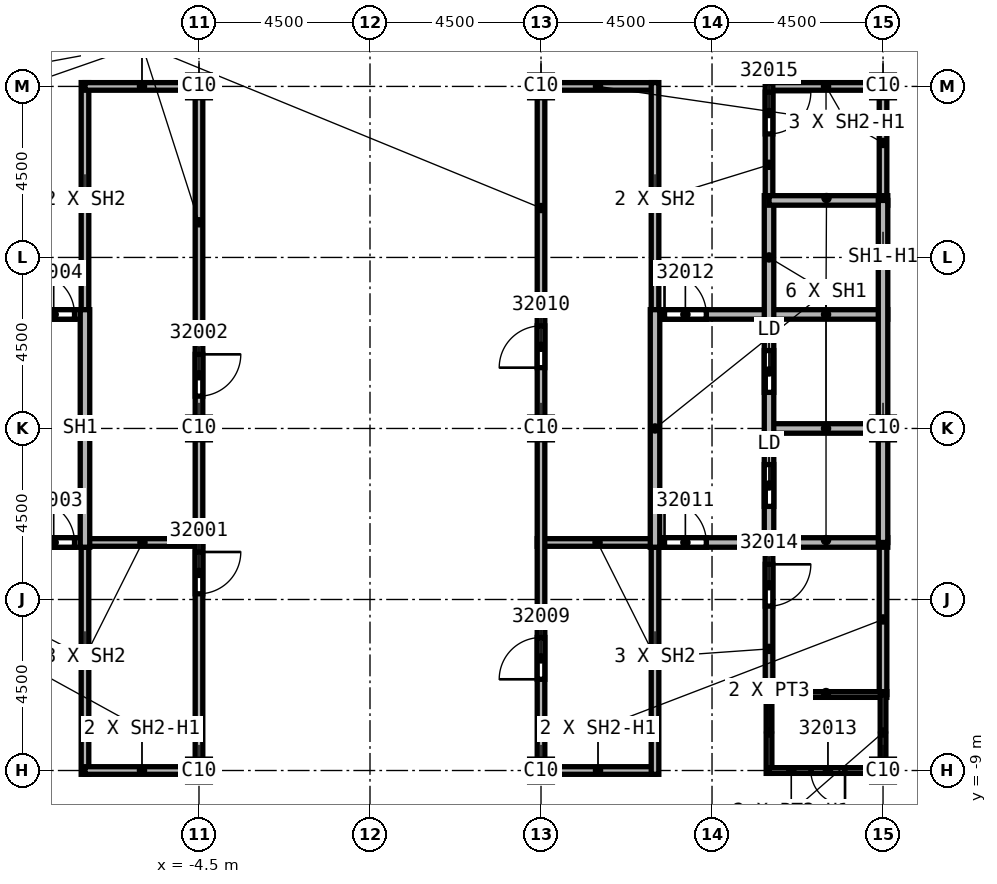
"""IFC4 building model, lengths in metres.
Left out: names, types, materials, properties, quantities, classifications, styles, units other than length and angle.
Written with IfcOpenShell. Run it as: python <this file> out.ifc"""

import sys

from ifc_helpers import new_model, si_unit, direction, frame, frame_2d, origin, origin_2d, place, context, subcontext, project, spatial, rectangle, extrude, element, fill, save


model = new_model("IFC4")
c1 = context("Model", 3, precision=1e-05, world=origin(), true_north=direction((0.0, 1.0)))
c2 = subcontext(c1, "Body", "Model", "MODEL_VIEW")
j1 = project(units=[si_unit("LENGTHUNIT", "METRE"), si_unit("PLANEANGLEUNIT", "RADIAN")], contexts=[c1])
p1 = place(None, origin())
s1 = spatial("IfcSite", under=j1, at=p1, CompositionType="ELEMENT")
p2 = place(p1, origin())
s2 = spatial("IfcBuilding", under=s1, at=p2, CompositionType="ELEMENT")
p3 = place(p2, frame((0.0, 0.0, 356.0)))
s3 = spatial("IfcBuildingStorey", under=s2, at=p3, CompositionType="ELEMENT", Elevation=356.0)
for number, where, z_axis, x_axis in (
    (1, (4.5, 0.0, 0.0), (0.0, 0.0, 1.0), (1.0, 0.0, 0.0)),
    (2, (4.5, 9.0, 0.0), (0.0, 0.0, 1.0), (1.0, 0.0, 0.0)),
    (3, (4.5, -9.0, 0.0), (0.0, 0.0, 1.0), (1.0, 0.0, 0.0)),
    (4, (13.5, 0.0, 0.0), (0.0, 0.0, 1.0), (1.0, 0.0, 0.0)),
    (5, (13.5, 9.0, 0.0), (0.0, 0.0, 1.0), (1.0, 0.0, 0.0)),
    (6, (13.5, -9.0, 0.0), (0.0, 0.0, 1.0), (1.0, 0.0, 0.0)),
    (7, (-4.5, 0.0, 0.0), (0.0, 0.0, 1.0), (1.0, 0.0, 0.0)),
    (8, (-4.5, 9.0, 0.0), (0.0, 0.0, 1.0), (1.0, 0.0, 0.0)),
    (9, (-4.5, -9.0, 0.0), (0.0, 0.0, 1.0), (1.0, 0.0, 0.0)),
):
    element("IfcColumn", number, at=place(p3, frame(where, z_axis=z_axis, x_axis=x_axis)), inside=s3, PredefinedType="COLUMN", context=c2, shape_type="SweptSolid", body=[
        extrude(rectangle(XDim=0.6, YDim=0.6, at=origin_2d()), origin(), (0.0, 0.0, 1.0), 4.6),
    ])
p4 = place(p3, frame((-7.625, -3.0, 0.0), z_axis=(0.0, 0.0, 1.0), x_axis=(1.0, 0.0, 0.0)))
e10 = element("IfcWall", 10, at=p4, inside=s3, PredefinedType="SOLIDWALL", context=c2, shape_type="SweptSolid", body=[
    extrude(rectangle(XDim=3.225, YDim=0.2, at=frame_2d((1.613, 0.0))), origin(), (0.0, 0.0, 1.0), 4.15),
])
for number, where, z_axis, x_axis in (
    (11, (-7.5, -9.1, 0.0), (0.0, 0.0, 1.0), (0.0, 1.0, 0.0)),
    (12, (-7.5, 2.875, 0.0), (0.0, 0.0, 1.0), (0.0, 1.0, 0.0)),
):
    element("IfcWall", number, at=place(p3, frame(where, z_axis=z_axis, x_axis=x_axis)), inside=s3, PredefinedType="SOLIDWALL", context=c2, shape_type="SweptSolid", body=[
        extrude(rectangle(XDim=6.225, YDim=0.2, at=frame_2d((3.113, 0.0))), origin(), (0.0, 0.0, 1.0), 4.15),
    ])
for number, where, z_axis, x_axis in (
    (13, (-7.5, 9.0, 0.0), (0.0, 0.0, 1.0), (1.0, 0.0, 0.0)),
    (14, (-4.5, -9.0, 0.0), (0.0, 0.0, 1.0), (-1.0, 0.0, 0.0)),
):
    element("IfcWall", number, at=place(p3, frame(where, z_axis=z_axis, x_axis=x_axis)), inside=s3, PredefinedType="SOLIDWALL", context=c2, shape_type="SweptSolid", body=[
        extrude(rectangle(XDim=3.0, YDim=0.2, at=frame_2d((1.5, 0.0))), origin(), (0.0, 0.0, 1.0), 3.838),
    ])
p5 = place(p3, frame((-4.5, 9.1, 0.0), z_axis=(0.0, 0.0, 1.0), x_axis=(0.0, -1.0, 0.0)))
e15 = element("IfcWall", 15, at=p5, inside=s3, PredefinedType="SOLIDWALL", context=c2, shape_type="SweptSolid", body=[
    extrude(rectangle(XDim=18.2, YDim=0.2, at=frame_2d((9.1, 0.0))), origin(), (0.0, 0.0, 1.0), 3.838),
])
p6 = place(p5, frame((12.35, 0.0, 0.0)))
e16 = element("IfcOpeningElement", 16, at=p6, cuts=e15, PredefinedType="OPENING", context=c2, shape_type="SweptSolid", body=[
    extrude(rectangle(XDim=1.1, YDim=2.1, at=frame_2d((0.55, 1.05))), frame((0.0, 0.1, 0.0), z_axis=(0.0, -1.0, 0.0), x_axis=(1.0, 0.0, 0.0)), (0.0, 0.0, 1.0), 0.2),
])
p7 = place(p5, frame((7.15, 0.0, 0.0)))
e17 = element("IfcOpeningElement", 17, at=p7, cuts=e15, PredefinedType="OPENING", context=c2, shape_type="SweptSolid", body=[
    extrude(rectangle(XDim=1.1, YDim=2.1, at=frame_2d((0.55, 1.05))), frame((0.0, 0.1, 0.0), z_axis=(0.0, -1.0, 0.0), x_axis=(1.0, 0.0, 0.0)), (0.0, 0.0, 1.0), 0.2),
])
p8 = place(p3, frame((4.4, -3.0, 0.0), z_axis=(0.0, 0.0, 1.0), x_axis=(1.0, 0.0, 0.0)))
e18 = element("IfcWall", 18, at=p8, inside=s3, PredefinedType="SOLIDWALL", context=c2, shape_type="SweptSolid", body=[
    extrude(rectangle(XDim=3.225, YDim=0.2, at=frame_2d((1.613, 0.0))), origin(), (0.0, 0.0, 1.0), 4.15),
])
p9 = place(p3, frame((4.5, -9.1, 0.0), z_axis=(0.0, 0.0, 1.0), x_axis=(0.0, 1.0, 0.0)))
e19 = element("IfcWall", 19, at=p9, inside=s3, PredefinedType="SOLIDWALL", context=c2, shape_type="SweptSolid", body=[
    extrude(rectangle(XDim=18.2, YDim=0.2, at=frame_2d((9.1, 0.0))), origin(), (0.0, 0.0, 1.0), 3.838),
])
p10 = place(p9, frame((2.5, 0.0, 0.0)))
e20 = element("IfcOpeningElement", 20, at=p10, cuts=e19, PredefinedType="OPENING", context=c2, shape_type="SweptSolid", body=[
    extrude(rectangle(XDim=1.1, YDim=2.1, at=frame_2d((0.55, 1.05))), frame((0.0, 0.1, 0.0), z_axis=(0.0, -1.0, 0.0), x_axis=(1.0, 0.0, 0.0)), (0.0, 0.0, 1.0), 0.2),
])
p11 = place(p9, frame((10.7, 0.0, 0.0)))
e21 = element("IfcOpeningElement", 21, at=p11, cuts=e19, PredefinedType="OPENING", context=c2, shape_type="SweptSolid", body=[
    extrude(rectangle(XDim=1.1, YDim=2.1, at=frame_2d((0.55, 1.05))), frame((0.0, 0.1, 0.0), z_axis=(0.0, -1.0, 0.0), x_axis=(1.0, 0.0, 0.0)), (0.0, 0.0, 1.0), 0.2),
])
for number, where, z_axis, x_axis in (
    (22, (4.5, 9.0, 0.0), (0.0, 0.0, 1.0), (1.0, 0.0, 0.0)),
    (23, (7.5, -9.0, 0.0), (0.0, 0.0, 1.0), (-1.0, 0.0, 0.0)),
):
    element("IfcWall", number, at=place(p3, frame(where, z_axis=z_axis, x_axis=x_axis)), inside=s3, PredefinedType="SOLIDWALL", context=c2, shape_type="SweptSolid", body=[
        extrude(rectangle(XDim=3.0, YDim=0.2, at=frame_2d((1.5, 0.0))), origin(), (0.0, 0.0, 1.0), 3.838),
    ])
for number, where, z_axis, x_axis in (
    (24, (7.5, -2.875, 0.0), (0.0, 0.0, 1.0), (0.0, -1.0, 0.0)),
    (25, (7.5, 9.1, 0.0), (0.0, 0.0, 1.0), (0.0, -1.0, 0.0)),
):
    element("IfcWall", number, at=place(p3, frame(where, z_axis=z_axis, x_axis=x_axis)), inside=s3, PredefinedType="SOLIDWALL", context=c2, shape_type="SweptSolid", body=[
        extrude(rectangle(XDim=6.225, YDim=0.2, at=frame_2d((3.113, 0.0))), origin(), (0.0, 0.0, 1.0), 4.15),
    ])
p12 = place(p3, frame((10.5, -2.875, 0.0), z_axis=(0.0, 0.0, 1.0), x_axis=(0.0, -1.0, 0.0)))
e26 = element("IfcWall", 26, at=p12, inside=s3, PredefinedType="SOLIDWALL", context=c2, shape_type="SweptSolid", body=[
    extrude(rectangle(XDim=4.2, YDim=0.2, at=frame_2d((2.1, 0.0))), origin(), (0.0, 0.0, 1.0), 4.15),
])
p13 = place(p12, frame((0.7, 0.0, 0.0)))
e27 = element("IfcOpeningElement", 27, at=p13, cuts=e26, PredefinedType="OPENING", context=c2, shape_type="SweptSolid", body=[
    extrude(rectangle(XDim=1.1, YDim=2.1, at=frame_2d((0.55, 1.05))), frame((0.0, 0.1, 0.0), z_axis=(0.0, -1.0, 0.0), x_axis=(1.0, 0.0, 0.0)), (0.0, 0.0, 1.0), 0.2),
])
p14 = place(p3, frame((10.5, 9.0, 0.0), z_axis=(0.0, 0.0, 1.0), x_axis=(1.0, 0.0, 0.0)))
e28 = element("IfcWall", 28, at=p14, inside=s3, PredefinedType="SOLIDWALL", context=c2, shape_type="SweptSolid", body=[
    extrude(rectangle(XDim=3.0, YDim=0.2, at=frame_2d((1.5, 0.0))), origin(), (0.0, 0.0, 1.0), 3.838),
])
p15 = place(p3, frame((10.5, 9.1, 0.0), z_axis=(0.0, 0.0, 1.0), x_axis=(0.0, -1.0, 0.0)))
e29 = element("IfcWall", 29, at=p15, inside=s3, PredefinedType="SOLIDWALL", context=c2, shape_type="SweptSolid", body=[
    extrude(rectangle(XDim=3.225, YDim=0.2, at=frame_2d((1.613, 0.0))), origin(), (0.0, 0.0, 1.0), 4.15),
])
p16 = place(p15, frame((0.25, 0.0, 0.0)))
e30 = element("IfcOpeningElement", 30, at=p16, cuts=e29, PredefinedType="OPENING", context=c2, shape_type="SweptSolid", body=[
    extrude(rectangle(XDim=1.1, YDim=2.1, at=frame_2d((0.55, 1.05))), frame((0.0, 0.1, 0.0), z_axis=(0.0, -1.0, 0.0), x_axis=(1.0, 0.0, 0.0)), (0.0, 0.0, 1.0), 0.2),
])
p17 = place(p3, frame((13.5, -3.0, 0.0), z_axis=(0.0, 0.0, 1.0), x_axis=(0.0, -1.0, 0.0)))
e31 = element("IfcWall", 31, at=p17, inside=s3, PredefinedType="SOLIDWALL", context=c2, shape_type="SweptSolid", body=[
    extrude(rectangle(XDim=4.0, YDim=0.2, at=frame_2d((2.0, 0.0))), origin(), (0.0, 0.0, 1.0), 3.838),
])
p18 = place(p3, frame((13.5, 9.1, 0.0), z_axis=(0.0, 0.0, 1.0), x_axis=(0.0, -1.0, 0.0)))
e32 = element("IfcWall", 32, at=p18, inside=s3, PredefinedType="SOLIDWALL", context=c2, shape_type="SweptSolid", body=[
    extrude(rectangle(XDim=3.1, YDim=0.2, at=frame_2d((1.55, 0.0))), origin(), (0.0, 0.0, 1.0), 3.838),
])
p19 = place(p3, frame((-13.625, 3.0, 0.0), z_axis=(0.0, 0.0, 1.0), x_axis=(1.0, 0.0, 0.0)))
e33 = element("IfcWall", 33, at=p19, inside=s3, PredefinedType="SOLIDWALL", context=c2, shape_type="SweptSolid", body=[
    extrude(rectangle(XDim=6.125, YDim=0.25, at=frame_2d((3.062, 0.0))), origin(), (0.0, 0.0, 1.0), 4.15),
])
p20 = place(p19, frame((4.75, 0.0, 0.0)))
e34 = element("IfcOpeningElement", 34, at=p20, cuts=e33, PredefinedType="OPENING", context=c2, shape_type="SweptSolid", body=[
    extrude(rectangle(XDim=1.1, YDim=2.1, at=frame_2d((0.55, 1.05))), frame((0.0, 0.125, 0.0), z_axis=(0.0, -1.0, 0.0), x_axis=(1.0, 0.0, 0.0)), (0.0, 0.0, 1.0), 0.25),
])
p21 = place(p3, frame((-13.625, -3.0, 0.0), z_axis=(0.0, 0.0, 1.0), x_axis=(1.0, 0.0, 0.0)))
e35 = element("IfcWall", 35, at=p21, inside=s3, PredefinedType="SOLIDWALL", context=c2, shape_type="SweptSolid", body=[
    extrude(rectangle(XDim=6.125, YDim=0.25, at=frame_2d((3.062, 0.0))), origin(), (0.0, 0.0, 1.0), 4.15),
])
p22 = place(p21, frame((4.75, 0.0, 0.0)))
e36 = element("IfcOpeningElement", 36, at=p22, cuts=e35, PredefinedType="OPENING", context=c2, shape_type="SweptSolid", body=[
    extrude(rectangle(XDim=1.1, YDim=2.1, at=frame_2d((0.55, 1.05))), frame((0.0, 0.125, 0.0), z_axis=(0.0, -1.0, 0.0), x_axis=(1.0, 0.0, 0.0)), (0.0, 0.0, 1.0), 0.25),
])
p23 = place(p3, frame((-7.5, -3.125, 0.0), z_axis=(0.0, 0.0, 1.0), x_axis=(0.0, 1.0, 0.0)))
e37 = element("IfcWall", 37, at=p23, inside=s3, PredefinedType="SOLIDWALL", context=c2, shape_type="SweptSolid", body=[
    extrude(rectangle(XDim=6.25, YDim=0.25, at=frame_2d((3.125, 0.0))), origin(), (0.0, 0.0, 1.0), 4.15),
])
p24 = place(p3, frame((7.5, -3.0, 0.0), z_axis=(0.0, 0.0, 1.0), x_axis=(1.0, 0.0, 0.0)))
e38 = element("IfcWall", 38, at=p24, inside=s3, PredefinedType="SOLIDWALL", context=c2, shape_type="SweptSolid", body=[
    extrude(rectangle(XDim=6.125, YDim=0.25, at=frame_2d((3.062, 0.0))), origin(), (0.0, 0.0, 1.0), 4.15),
])
p25 = place(p24, frame((0.25, 0.0, 0.0)))
e39 = element("IfcOpeningElement", 39, at=p25, cuts=e38, PredefinedType="OPENING", context=c2, shape_type="SweptSolid", body=[
    extrude(rectangle(XDim=1.1, YDim=2.1, at=frame_2d((0.55, 1.05))), frame((0.0, 0.125, 0.0), z_axis=(0.0, -1.0, 0.0), x_axis=(1.0, 0.0, 0.0)), (0.0, 0.0, 1.0), 0.25),
])
p26 = place(p3, frame((7.5, 3.0, 0.0), z_axis=(0.0, 0.0, 1.0), x_axis=(1.0, 0.0, 0.0)))
e40 = element("IfcWall", 40, at=p26, inside=s3, PredefinedType="SOLIDWALL", context=c2, shape_type="SweptSolid", body=[
    extrude(rectangle(XDim=6.125, YDim=0.25, at=frame_2d((3.062, 0.0))), origin(), (0.0, 0.0, 1.0), 4.15),
])
p27 = place(p26, frame((0.25, 0.0, 0.0)))
e41 = element("IfcOpeningElement", 41, at=p27, cuts=e40, PredefinedType="OPENING", context=c2, shape_type="SweptSolid", body=[
    extrude(rectangle(XDim=1.1, YDim=2.1, at=frame_2d((0.55, 1.05))), frame((0.0, 0.125, 0.0), z_axis=(0.0, -1.0, 0.0), x_axis=(1.0, 0.0, 0.0)), (0.0, 0.0, 1.0), 0.25),
])
p28 = place(p3, frame((7.5, 3.125, 0.0), z_axis=(0.0, 0.0, 1.0), x_axis=(0.0, -1.0, 0.0)))
e42 = element("IfcWall", 42, at=p28, inside=s3, PredefinedType="SOLIDWALL", context=c2, shape_type="SweptSolid", body=[
    extrude(rectangle(XDim=6.25, YDim=0.25, at=frame_2d((3.125, 0.0))), origin(), (0.0, 0.0, 1.0), 4.15),
])
p29 = place(p3, frame((10.5, 0.0, 0.0), z_axis=(0.0, 0.0, 1.0), x_axis=(1.0, 0.0, 0.0)))
e43 = element("IfcWall", 43, at=p29, inside=s3, PredefinedType="SOLIDWALL", context=c2, shape_type="SweptSolid", body=[
    extrude(rectangle(XDim=3.125, YDim=0.25, at=frame_2d((1.562, 0.0))), origin(), (0.0, 0.0, 1.0), 4.15),
])
p30 = place(p3, frame((10.5, 6.125, 0.0), z_axis=(0.0, 0.0, 1.0), x_axis=(0.0, -1.0, 0.0)))
e44 = element("IfcWall", 44, at=p30, inside=s3, PredefinedType="SOLIDWALL", context=c2, shape_type="SweptSolid", body=[
    extrude(rectangle(XDim=9.25, YDim=0.25, at=frame_2d((4.625, 0.0))), origin(), (0.0, 0.0, 1.0), 4.15),
])
p31 = place(p30, frame((7.075, 0.0, 0.0)))
e45 = element("IfcOpeningElement", 45, at=p31, cuts=e44, PredefinedType="OPENING", context=c2, shape_type="SweptSolid", body=[
    extrude(rectangle(XDim=1.1, YDim=2.1, at=frame_2d((0.55, 1.05))), frame((0.0, 0.125, 0.0), z_axis=(0.0, -1.0, 0.0), x_axis=(1.0, 0.0, 0.0)), (0.0, 0.0, 1.0), 0.25),
])
p32 = place(p30, frame((4.075, 0.0, 0.0)))
e46 = element("IfcOpeningElement", 46, at=p32, cuts=e44, PredefinedType="OPENING", context=c2, shape_type="SweptSolid", body=[
    extrude(rectangle(XDim=1.1, YDim=2.1, at=frame_2d((0.55, 1.05))), frame((0.0, 0.125, 0.0), z_axis=(0.0, -1.0, 0.0), x_axis=(1.0, 0.0, 0.0)), (0.0, 0.0, 1.0), 0.25),
])
p33 = place(p3, frame((10.5, 6.0, 0.0), z_axis=(0.0, 0.0, 1.0), x_axis=(1.0, 0.0, 0.0)))
e47 = element("IfcWall", 47, at=p33, inside=s3, PredefinedType="SOLIDWALL", context=c2, shape_type="SweptSolid", body=[
    extrude(rectangle(XDim=3.125, YDim=0.25, at=frame_2d((1.562, 0.0))), origin(), (0.0, 0.0, 1.0), 4.15),
])
p34 = place(p3, frame((13.5, 6.0, 0.0), z_axis=(0.0, 0.0, 1.0), x_axis=(0.0, -1.0, 0.0)))
e48 = element("IfcWall", 48, at=p34, inside=s3, PredefinedType="SOLIDWALL", context=c2, shape_type="SweptSolid", body=[
    extrude(rectangle(XDim=9.0, YDim=0.25, at=frame_2d((4.5, 0.0))), origin(), (0.0, 0.0, 1.0), 3.838),
])
p35 = place(p3, frame((10.5, -7.0, 0.0), z_axis=(0.0, 0.0, 1.0), x_axis=(1.0, 0.0, 0.0)))
e49 = element("IfcWall", 49, at=p35, inside=s3, PredefinedType="PARTITIONING", context=c2, shape_type="SweptSolid", body=[
    extrude(rectangle(XDim=3.1, YDim=0.15, at=frame_2d((1.55, 0.0))), origin(), (0.0, 0.0, 1.0), 4.15),
])
p36 = place(p3, frame((10.5, -6.925, 0.0), z_axis=(0.0, 0.0, 1.0), x_axis=(0.0, -1.0, 0.0)))
e50 = element("IfcWall", 50, at=p36, inside=s3, PredefinedType="PARTITIONING", context=c2, shape_type="SweptSolid", body=[
    extrude(rectangle(XDim=2.15, YDim=0.15, at=frame_2d((1.075, 0.0))), origin(), (0.0, 0.0, 1.0), 4.15),
])
p37 = place(p3, frame((13.5, -9.0, 0.0), z_axis=(0.0, 0.0, 1.0), x_axis=(-1.0, 0.0, 0.0)))
e51 = element("IfcWall", 51, at=p37, inside=s3, PredefinedType="PARTITIONING", context=c2, shape_type="SweptSolid", body=[
    extrude(rectangle(XDim=3.0, YDim=0.15, at=frame_2d((1.5, 0.0))), origin(), (0.0, 0.0, 1.0), 3.838),
])
p38 = place(p37, frame((1.0, 0.0, 0.0)))
e52 = element("IfcOpeningElement", 52, at=p38, cuts=e51, PredefinedType="OPENING", context=c2, shape_type="SweptSolid", body=[
    extrude(rectangle(XDim=0.9, YDim=2.1, at=frame_2d((0.45, 1.05))), frame((0.0, 0.075, 0.0), z_axis=(0.0, -1.0, 0.0), x_axis=(1.0, 0.0, 0.0)), (0.0, 0.0, 1.0), 0.15),
])
p39 = place(p3, frame((13.5, -7.0, 0.0), z_axis=(0.0, 0.0, 1.0), x_axis=(0.0, -1.0, 0.0)))
e53 = element("IfcWall", 53, at=p39, inside=s3, PredefinedType="PARTITIONING", context=c2, shape_type="SweptSolid", body=[
    extrude(rectangle(XDim=2.075, YDim=0.15, at=frame_2d((1.038, 0.0))), origin(), (0.0, 0.0, 1.0), 3.838),
])
p40 = place(p6, origin())
e54 = element("IfcDoor", 54, at=p40, inside=s3, OperationType="SINGLE_SWING_RIGHT", PredefinedType="DOOR", context=c2, shape_type="SweptSolid", body=[
    extrude(rectangle(XDim=1.1, YDim=2.1, at=frame_2d((0.55, 1.05))), frame((0.0, 0.025, 0.0), z_axis=(0.0, -1.0, 0.0), x_axis=(1.0, 0.0, 0.0)), (0.0, 0.0, 1.0), 0.05),
])
fill(e16, e54)
p41 = place(p7, origin())
e55 = element("IfcDoor", 55, at=p41, inside=s3, OperationType="SINGLE_SWING_LEFT", PredefinedType="DOOR", context=c2, shape_type="SweptSolid", body=[
    extrude(rectangle(XDim=1.1, YDim=2.1, at=frame_2d((0.55, 1.05))), frame((0.0, 0.025, 0.0), z_axis=(0.0, -1.0, 0.0), x_axis=(1.0, 0.0, 0.0)), (0.0, 0.0, 1.0), 0.05),
])
fill(e17, e55)
p42 = place(p22, origin())
e56 = element("IfcDoor", 56, at=p42, inside=s3, OperationType="SINGLE_SWING_RIGHT", PredefinedType="DOOR", context=c2, shape_type="SweptSolid", body=[
    extrude(rectangle(XDim=1.1, YDim=2.1, at=frame_2d((0.55, 1.05))), frame((0.0, 0.025, 0.0), z_axis=(0.0, -1.0, 0.0), x_axis=(1.0, 0.0, 0.0)), (0.0, 0.0, 1.0), 0.05),
])
fill(e36, e56)
p43 = place(p20, origin())
e57 = element("IfcDoor", 57, at=p43, inside=s3, OperationType="SINGLE_SWING_LEFT", PredefinedType="DOOR", context=c2, shape_type="SweptSolid", body=[
    extrude(rectangle(XDim=1.1, YDim=2.1, at=frame_2d((0.55, 1.05))), frame((0.0, 0.025, 0.0), z_axis=(0.0, -1.0, 0.0), x_axis=(1.0, 0.0, 0.0)), (0.0, 0.0, 1.0), 0.05),
])
fill(e34, e57)
p44 = place(p10, origin())
e58 = element("IfcDoor", 58, at=p44, inside=s3, OperationType="SINGLE_SWING_RIGHT", PredefinedType="DOOR", context=c2, shape_type="SweptSolid", body=[
    extrude(rectangle(XDim=1.1, YDim=2.1, at=frame_2d((0.55, 1.05))), frame((0.0, 0.025, 0.0), z_axis=(0.0, -1.0, 0.0), x_axis=(1.0, 0.0, 0.0)), (0.0, 0.0, 1.0), 0.05),
])
fill(e20, e58)
p45 = place(p11, origin())
e59 = element("IfcDoor", 59, at=p45, inside=s3, OperationType="SINGLE_SWING_LEFT", PredefinedType="DOOR", context=c2, shape_type="SweptSolid", body=[
    extrude(rectangle(XDim=1.1, YDim=2.1, at=frame_2d((0.55, 1.05))), frame((0.0, 0.025, 0.0), z_axis=(0.0, -1.0, 0.0), x_axis=(1.0, 0.0, 0.0)), (0.0, 0.0, 1.0), 0.05),
])
fill(e21, e59)
p46 = place(p25, origin())
e60 = element("IfcDoor", 60, at=p46, inside=s3, OperationType="SINGLE_SWING_RIGHT", PredefinedType="DOOR", context=c2, shape_type="SweptSolid", body=[
    extrude(rectangle(XDim=1.1, YDim=2.1, at=frame_2d((0.55, 1.05))), frame((0.0, 0.025, 0.0), z_axis=(0.0, -1.0, 0.0), x_axis=(1.0, 0.0, 0.0)), (0.0, 0.0, 1.0), 0.05),
])
fill(e39, e60)
p47 = place(p27, origin())
e61 = element("IfcDoor", 61, at=p47, inside=s3, OperationType="SINGLE_SWING_LEFT", PredefinedType="DOOR", context=c2, shape_type="SweptSolid", body=[
    extrude(rectangle(XDim=1.1, YDim=2.1, at=frame_2d((0.55, 1.05))), frame((0.0, 0.025, 0.0), z_axis=(0.0, -1.0, 0.0), x_axis=(1.0, 0.0, 0.0)), (0.0, 0.0, 1.0), 0.05),
])
fill(e41, e61)
p48 = place(p38, origin())
e62 = element("IfcDoor", 62, at=p48, inside=s3, OperationType="SINGLE_SWING_RIGHT", PredefinedType="DOOR", context=c2, shape_type="SweptSolid", body=[
    extrude(rectangle(XDim=0.9, YDim=2.1, at=frame_2d((0.45, 1.05))), frame((0.0, 0.025, 0.0), z_axis=(0.0, -1.0, 0.0), x_axis=(1.0, 0.0, 0.0)), (0.0, 0.0, 1.0), 0.05),
])
fill(e52, e62)
p49 = place(p13, origin())
e63 = element("IfcDoor", 63, at=p49, inside=s3, OperationType="SINGLE_SWING_LEFT", PredefinedType="DOOR", context=c2, shape_type="SweptSolid", body=[
    extrude(rectangle(XDim=1.1, YDim=2.1, at=frame_2d((0.55, 1.05))), frame((0.0, 0.025, 0.0), z_axis=(0.0, -1.0, 0.0), x_axis=(1.0, 0.0, 0.0)), (0.0, 0.0, 1.0), 0.05),
])
fill(e27, e63)
p50 = place(p16, origin())
e64 = element("IfcDoor", 64, at=p50, inside=s3, OperationType="SINGLE_SWING_RIGHT", PredefinedType="DOOR", context=c2, shape_type="SweptSolid", body=[
    extrude(rectangle(XDim=1.1, YDim=2.1, at=frame_2d((0.55, 1.05))), frame((0.0, 0.025, 0.0), z_axis=(0.0, -1.0, 0.0), x_axis=(1.0, 0.0, 0.0)), (0.0, 0.0, 1.0), 0.05),
])
fill(e30, e64)
p51 = place(p31, origin())
e65 = element("IfcDoor", 65, at=p51, inside=s3, OperationType="SLIDING_TO_LEFT", PredefinedType="DOOR", context=c2, shape_type="SweptSolid", body=[
    extrude(rectangle(XDim=1.1, YDim=2.1, at=frame_2d((0.55, 1.05))), frame((0.0, 0.025, 0.0), z_axis=(0.0, -1.0, 0.0), x_axis=(1.0, 0.0, 0.0)), (0.0, 0.0, 1.0), 0.05),
])
fill(e45, e65)
p52 = place(p32, origin())
e66 = element("IfcDoor", 66, at=p52, inside=s3, OperationType="SLIDING_TO_LEFT", PredefinedType="DOOR", context=c2, shape_type="SweptSolid", body=[
    extrude(rectangle(XDim=1.1, YDim=2.1, at=frame_2d((0.55, 1.05))), frame((0.0, 0.025, 0.0), z_axis=(0.0, -1.0, 0.0), x_axis=(1.0, 0.0, 0.0)), (0.0, 0.0, 1.0), 0.05),
])
fill(e46, e66)
save(model, sys.argv[1])
